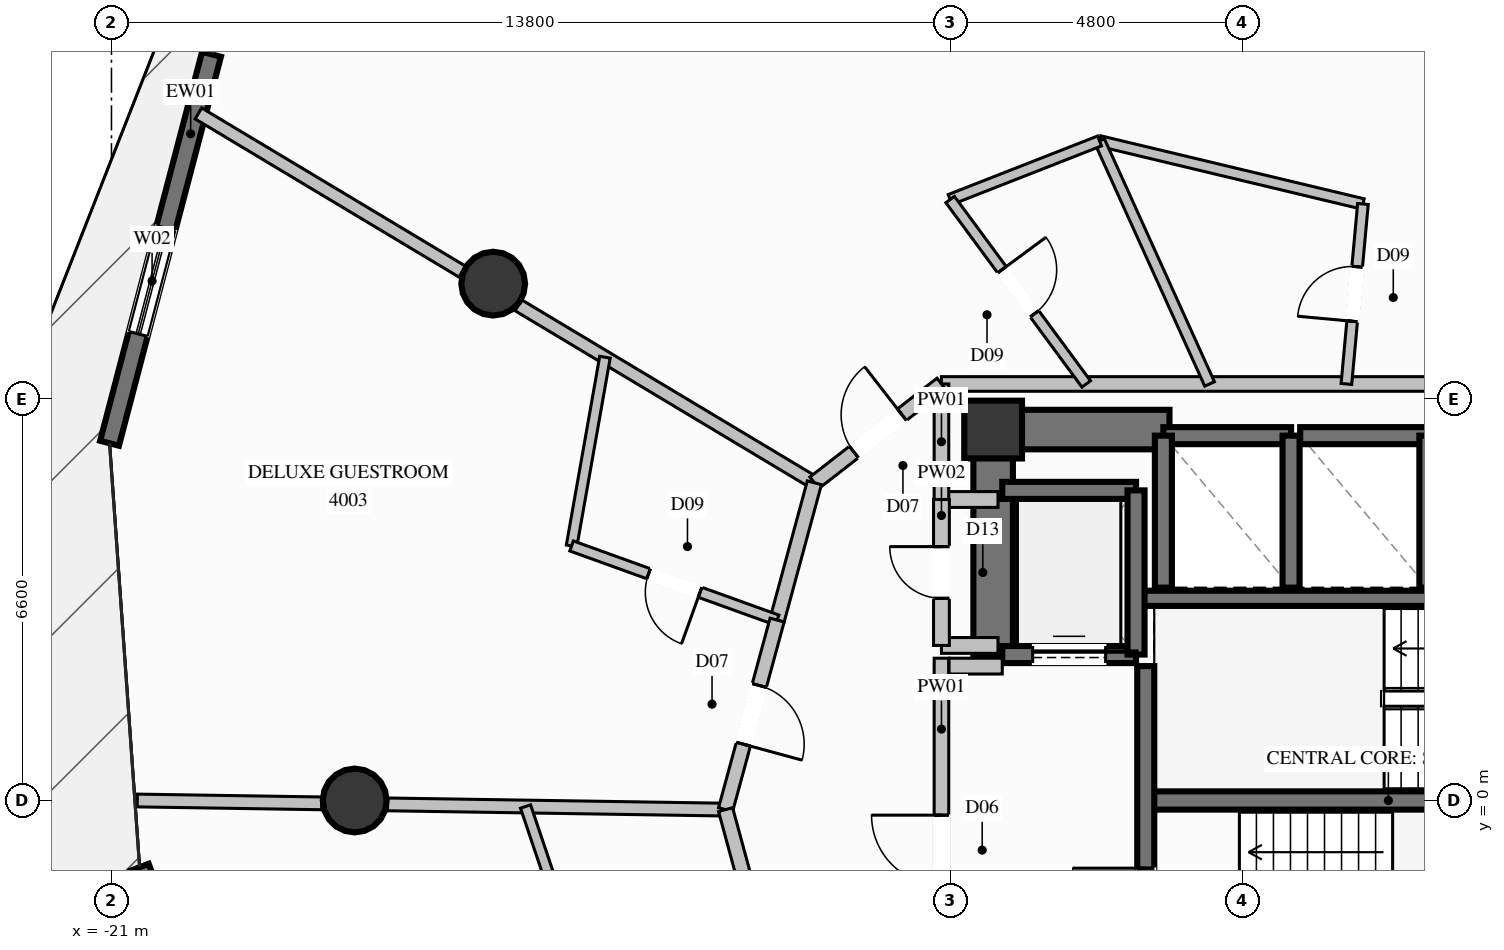
"""IFC4 building model, lengths in metres.
Left out: names, types, materials, properties, quantities, classifications, styles, units other than length and angle.
Written with IfcOpenShell. Run it as: python <this file> out.ifc"""

import sys

from ifc_helpers import new_model, si_unit, direction, frame, frame_2d, origin, origin_2d, place, context, subcontext, project, spatial, rectangle, circle, extrude, element, fill, save


model = new_model("IFC4")
c1 = context("Model", 3, precision=1e-05, world=origin(), true_north=direction((0.0, 1.0)))
c2 = subcontext(c1, "Body", "Model", "MODEL_VIEW")
j1 = project(units=[si_unit("LENGTHUNIT", "METRE"), si_unit("PLANEANGLEUNIT", "RADIAN")], contexts=[c1])
p1 = place(None, origin())
s1 = spatial("IfcSite", under=j1, at=p1, CompositionType="ELEMENT")
p2 = place(p1, origin())
s2 = spatial("IfcBuilding", under=s1, at=p2, CompositionType="ELEMENT")
p3 = place(p2, frame((0.0, 0.0, 149.4)))
s3 = spatial("IfcBuildingStorey", under=s2, at=p3, CompositionType="ELEMENT", Elevation=149.4)
p4 = place(p3, frame((-6.5, 6.1, 0.0), z_axis=(0.0, 0.0, 1.0), x_axis=(1.0, 0.0, 0.0)))
e1 = element("IfcColumn", 1, at=p4, inside=s3, PredefinedType="COLUMN", context=c2, shape_type="SweptSolid", body=[
    extrude(rectangle(XDim=0.95, YDim=0.95, at=origin_2d()), origin(), (0.0, 0.0, 1.0), 3.6),
])
p5 = place(p3, frame((-3.99, 0.0, 0.0), z_axis=(0.0, 0.0, 1.0), x_axis=(1.0, 0.0, 0.0)))
e2 = element("IfcWall", 2, at=p5, inside=s3, PredefinedType="SHEAR", context=c2, shape_type="SweptSolid", body=[
    extrude(rectangle(XDim=7.98, YDim=0.3, at=frame_2d((3.99, 0.0))), origin(), (0.0, 0.0, 1.0), 3.6),
])
p6 = place(p3, frame((-4.13, 3.325, 0.0), z_axis=(0.0, 0.0, 1.0), x_axis=(1.0, 0.0, 0.0)))
e3 = element("IfcWall", 3, at=p6, inside=s3, PredefinedType="SOLIDWALL", context=c2, shape_type="SweptSolid", body=[
    extrude(rectangle(XDim=8.26, YDim=0.25, at=frame_2d((4.13, 0.0))), origin(), (0.0, 0.0, 1.0), 3.6),
])
p7 = place(p3, frame((-6.175, 6.1, 0.0), z_axis=(0.0, 0.0, 1.0), x_axis=(1.0, 0.0, 0.0)))
e4 = element("IfcWall", 4, at=p7, inside=s3, PredefinedType="SHEAR", context=c2, shape_type="SweptSolid", body=[
    extrude(rectangle(XDim=2.575, YDim=0.65, at=frame_2d((1.288, 0.0))), origin(), (0.0, 0.0, 1.0), 3.6),
])
p8 = place(p3, frame((-6.5, 2.35, 0.0), z_axis=(0.0, 0.0, 1.0), x_axis=(0.0, 1.0, 0.0)))
e5 = element("IfcWall", 5, at=p8, inside=s3, PredefinedType="SHEAR", context=c2, shape_type="SweptSolid", body=[
    extrude(rectangle(XDim=4.075, YDim=0.65, at=frame_2d((2.038, 0.0))), origin(), (0.0, 0.0, 1.0), 3.6),
])
for number, where, z_axis, x_axis in (
    (6, (-14.722, 8.5, 0.0), (0.0, 0.0, 1.0), (1.0, 0.0, 0.0)),
    (7, (-17.0, 0.0, 0.0), (0.0, 0.0, 1.0), (1.0, 0.0, 0.0)),
):
    element("IfcColumn", number, at=place(p3, frame(where, z_axis=z_axis, x_axis=x_axis)), inside=s3, PredefinedType="COLUMN", context=c2, shape_type="SweptSolid", body=[
        extrude(circle(Radius=0.525, at=origin_2d()), origin(), (0.0, 0.0, 1.0), 3.6),
    ])
p9 = place(p3, frame((-21.032, 5.875, 0.0), z_axis=(0.0, 0.0, 1.0), x_axis=(0.253586412891, 0.967312737018, 0.0)))
e8 = element("IfcWall", 8, at=p9, inside=s3, PredefinedType="SOLIDWALL", context=c2, shape_type="SweptSolid", body=[
    extrude(rectangle(XDim=6.613, YDim=0.32, at=frame_2d((3.307, 0.0))), origin(), (0.0, 0.0, 1.0), 3.35),
])
p10 = place(p9, frame((1.859, 0.0, 0.35)))
e9 = element("IfcOpeningElement", 9, at=p10, cuts=e8, PredefinedType="OPENING", context=c2, shape_type="SweptSolid", body=[
    extrude(rectangle(XDim=1.8, YDim=2.6, at=frame_2d((0.9, 1.3))), frame((0.0, 0.17, 0.0), z_axis=(0.0, -1.0, 0.0), x_axis=(1.0, 0.0, 0.0)), (0.0, 0.0, 1.0), 0.34),
])
p11 = place(p3, frame((-17.92, -7.961, 0.0), z_axis=(0.0, 0.0, 1.0), x_axis=(-0.356387771418, 0.93433813814, 0.0)))
e10 = element("IfcWall", 10, at=p11, inside=s3, PredefinedType="SOLIDWALL", context=c2, shape_type="SweptSolid", body=[
    extrude(rectangle(XDim=7.346, YDim=0.32, at=frame_2d((3.673, 0.0))), origin(), (0.0, 0.0, 1.0), 3.35),
])
p12 = place(p11, frame((2.773, 0.0, 0.35)))
e11 = element("IfcOpeningElement", 11, at=p12, cuts=e10, PredefinedType="OPENING", context=c2, shape_type="SweptSolid", body=[
    extrude(rectangle(XDim=1.8, YDim=2.6, at=frame_2d((0.9, 1.3))), frame((0.0, 0.17, 0.0), z_axis=(0.0, -1.0, 0.0), x_axis=(1.0, 0.0, 0.0)), (0.0, 0.0, 1.0), 0.34),
])
p13 = place(p3, frame((-1.6, 6.0, 0.0), z_axis=(0.0, 0.0, 1.0), x_axis=(-1.0, 0.0, 0.0)))
e12 = element("IfcWall", 12, at=p13, inside=s3, PredefinedType="SOLIDWALL", context=c2, shape_type="SweptSolid", body=[
    extrude(rectangle(XDim=2.1, YDim=0.28, at=frame_2d((1.05, 0.0))), origin(), (0.0, 0.0, 1.0), 3.35),
])
for number, where, z_axis, x_axis in (
    (13, (-3.7, 6.0, 0.0), (0.0, 0.0, 1.0), (0.0, -1.0, 0.0)),
    (14, (-1.6, 3.5, 0.0), (0.0, 0.0, 1.0), (0.0, 1.0, 0.0)),
):
    element("IfcWall", number, at=place(p3, frame(where, z_axis=z_axis, x_axis=x_axis)), inside=s3, PredefinedType="SOLIDWALL", context=c2, shape_type="SweptSolid", body=[
        extrude(rectangle(XDim=2.5, YDim=0.28, at=frame_2d((1.25, 0.0))), origin(), (0.0, 0.0, 1.0), 3.35),
    ])
p14 = place(p3, frame((0.65, 6.0, 0.0), z_axis=(0.0, 0.0, 1.0), x_axis=(-1.0, 0.0, 0.0)))
e15 = element("IfcWall", 15, at=p14, inside=s3, PredefinedType="SOLIDWALL", context=c2, shape_type="SweptSolid", body=[
    extrude(rectangle(XDim=2.1, YDim=0.28, at=frame_2d((1.05, 0.0))), origin(), (0.0, 0.0, 1.0), 3.35),
])
p15 = place(p3, frame((0.65, 3.5, 0.0), z_axis=(0.0, 0.0, 1.0), x_axis=(0.0, 1.0, 0.0)))
e16 = element("IfcWall", 16, at=p15, inside=s3, PredefinedType="SOLIDWALL", context=c2, shape_type="SweptSolid", body=[
    extrude(rectangle(XDim=2.5, YDim=0.28, at=frame_2d((1.25, 0.0))), origin(), (0.0, 0.0, 1.0), 3.35),
])
p16 = place(p3, frame((-6.35, 2.4, 0.0), z_axis=(0.0, 0.0, 1.0), x_axis=(1.0, 0.0, 0.0)))
e17 = element("IfcWall", 17, at=p16, inside=s3, PredefinedType="SOLIDWALL", context=c2, shape_type="SweptSolid", body=[
    extrude(rectangle(XDim=2.2, YDim=0.28, at=frame_2d((1.1, 0.0))), origin(), (0.0, 0.0, 1.0), 3.35),
])
p17 = place(p16, frame((0.5, 0.0, 0.0)))
e18 = element("IfcOpeningElement", 18, at=p17, cuts=e17, PredefinedType="OPENING", context=c2, shape_type="SweptSolid", body=[
    extrude(rectangle(XDim=1.2, YDim=2.2, at=frame_2d((0.6, 1.1))), frame((0.0, 0.15, 0.0), z_axis=(0.0, -1.0, 0.0), x_axis=(1.0, 0.0, 0.0)), (0.0, 0.0, 1.0), 0.3),
])
p18 = place(p3, frame((-4.15, 5.1, 0.0), z_axis=(0.0, 0.0, 1.0), x_axis=(-1.0, 0.0, 0.0)))
e19 = element("IfcWall", 19, at=p18, inside=s3, PredefinedType="SOLIDWALL", context=c2, shape_type="SweptSolid", body=[
    extrude(rectangle(XDim=2.2, YDim=0.28, at=frame_2d((1.1, 0.0))), origin(), (0.0, 0.0, 1.0), 3.35),
])
p19 = place(p3, frame((-4.15, 2.4, 0.0), z_axis=(0.0, 0.0, 1.0), x_axis=(0.0, 1.0, 0.0)))
e20 = element("IfcWall", 20, at=p19, inside=s3, PredefinedType="SOLIDWALL", context=c2, shape_type="SweptSolid", body=[
    extrude(rectangle(XDim=2.7, YDim=0.28, at=frame_2d((1.35, 0.0))), origin(), (0.0, 0.0, 1.0), 3.35),
])
p20 = place(p3, frame((-3.99, -3.25, 0.0), z_axis=(0.0, 0.0, 1.0), x_axis=(0.0, 1.0, 0.0)))
e21 = element("IfcWall", 21, at=p20, inside=s3, PredefinedType="SOLIDWALL", context=c2, shape_type="SweptSolid", body=[
    extrude(rectangle(XDim=5.46, YDim=0.28, at=frame_2d((2.73, 0.0))), origin(), (0.0, 0.0, 1.0), 3.35),
])
p21 = place(p20, frame((0.937, 0.0, 0.0)))
e22 = element("IfcOpeningElement", 22, at=p21, cuts=e21, PredefinedType="OPENING", context=c2, shape_type="SweptSolid", body=[
    extrude(rectangle(XDim=1.2, YDim=2.2, at=frame_2d((0.6, 1.1))), frame((0.0, 0.15, 0.0), z_axis=(0.0, -1.0, 0.0), x_axis=(1.0, 0.0, 0.0)), (0.0, 0.0, 1.0), 0.3),
])
p22 = place(p3, frame((-7.35, -2.78, 0.0), z_axis=(0.0, 0.0, 1.0), x_axis=(0.0, 1.0, 0.0)))
e23 = element("IfcWall", 23, at=p22, inside=s3, PredefinedType="PARTITIONING", context=c2, shape_type="SweptSolid", body=[
    extrude(rectangle(XDim=5.12, YDim=0.24, at=frame_2d((2.56, 0.0))), origin(), (0.0, 0.0, 1.0), 2.435),
])
p23 = place(p22, frame((1.389, 0.0, 0.0)))
e24 = element("IfcOpeningElement", 24, at=p23, cuts=e23, PredefinedType="OPENING", context=c2, shape_type="SweptSolid", body=[
    extrude(rectangle(XDim=1.15, YDim=2.2, at=frame_2d((0.575, 1.1))), frame((0.0, 0.13, 0.0), z_axis=(0.0, -1.0, 0.0), x_axis=(1.0, 0.0, 0.0)), (0.0, 0.0, 1.0), 0.26),
])
p24 = place(p3, frame((-7.225, 2.21, 0.0), z_axis=(0.0, 0.0, 1.0), x_axis=(1.0, 0.0, 0.0)))
e25 = element("IfcWall", 25, at=p24, inside=s3, PredefinedType="PARTITIONING", context=c2, shape_type="SweptSolid", body=[
    extrude(rectangle(XDim=0.875, YDim=0.26, at=frame_2d((0.438, 0.0))), origin(), (0.0, 0.0, 1.0), 3.35),
])
for number, where, z_axis, x_axis in (
    (26, (-7.35, 4.95, 0.0), (0.0, 0.0, 1.0), (1.0, 0.0, 0.0)),
    (27, (-7.35, 2.55, 0.0), (0.0, 0.0, 1.0), (1.0, 0.0, 0.0)),
):
    element("IfcWall", number, at=place(p3, frame(where, z_axis=z_axis, x_axis=x_axis)), inside=s3, PredefinedType="PARTITIONING", context=c2, shape_type="SweptSolid", body=[
        extrude(rectangle(XDim=0.93, YDim=0.26, at=frame_2d((0.465, 0.0))), origin(), (0.0, 0.0, 1.0), 3.35),
    ])
p25 = place(p3, frame((-7.35, 2.55, 0.0), z_axis=(0.0, 0.0, 1.0), x_axis=(0.0, 1.0, 0.0)))
e28 = element("IfcWall", 28, at=p25, inside=s3, PredefinedType="PARTITIONING", context=c2, shape_type="SweptSolid", body=[
    extrude(rectangle(XDim=2.4, YDim=0.26, at=frame_2d((1.2, 0.0))), origin(), (0.0, 0.0, 1.0), 2.435),
])
p26 = place(p25, frame((0.775, 0.0, 0.0)))
e29 = element("IfcOpeningElement", 29, at=p26, cuts=e28, PredefinedType="OPENING", context=c2, shape_type="SweptSolid", body=[
    extrude(rectangle(XDim=0.85, YDim=2.05, at=frame_2d((0.425, 1.025))), frame((0.0, 0.14, 0.0), z_axis=(0.0, -1.0, 0.0), x_axis=(1.0, 0.0, 0.0)), (0.0, 0.0, 1.0), 0.28),
])
p27 = place(p3, frame((-7.35, 6.85, 0.0), z_axis=(0.0, 0.0, 1.0), x_axis=(1.0, 0.0, 0.0)))
e30 = element("IfcWall", 30, at=p27, inside=s3, PredefinedType="PARTITIONING", context=c2, shape_type="SweptSolid", body=[
    extrude(rectangle(XDim=14.7, YDim=0.24, at=frame_2d((7.35, 0.0))), origin(), (0.0, 0.0, 1.0), 2.435),
])
p28 = place(p3, frame((-7.35, 4.95, 0.0), z_axis=(0.0, 0.0, 1.0), x_axis=(0.0, 1.0, 0.0)))
e31 = element("IfcWall", 31, at=p28, inside=s3, PredefinedType="PARTITIONING", context=c2, shape_type="SweptSolid", body=[
    extrude(rectangle(XDim=1.9, YDim=0.24, at=frame_2d((0.95, 0.0))), origin(), (0.0, 0.0, 1.0), 2.435),
])
p29 = place(p3, frame((-9.44, 5.225, 0.0), z_axis=(0.0, 0.0, 1.0), x_axis=(-0.857690179355, 0.514166856417, 0.0)))
e32 = element("IfcWall", 32, at=p29, inside=s3, PredefinedType="PARTITIONING", context=c2, shape_type="SweptSolid", body=[
    extrude(rectangle(XDim=5.677, YDim=0.21, at=frame_2d((2.838, 0.0))), origin(), (0.0, 0.0, 1.0), 2.717),
])
p30 = place(p3, frame((-15.23, 8.697, 0.0), z_axis=(0.0, 0.0, 1.0), x_axis=(-0.857667413019, 0.514204831409, 0.0)))
e33 = element("IfcWall", 33, at=p30, inside=s3, PredefinedType="PARTITIONING", context=c2, shape_type="SweptSolid", body=[
    extrude(rectangle(XDim=5.06, YDim=0.21, at=frame_2d((2.53, 0.0))), origin(), (0.0, 0.0, 1.0), 3.35),
])
p31 = place(p3, frame((-10.9, -0.15, 0.0), z_axis=(0.0, 0.0, 1.0), x_axis=(-0.999880532043, 0.01545709035, 0.0)))
e34 = element("IfcWall", 34, at=p31, inside=s3, PredefinedType="PARTITIONING", context=c2, shape_type="SweptSolid", body=[
    extrude(rectangle(XDim=5.56, YDim=0.21, at=frame_2d((2.78, 0.0))), origin(), (0.0, 0.0, 1.0), 3.35),
])
p32 = place(p3, frame((-17.543, -0.047, 0.0), z_axis=(0.0, 0.0, 1.0), x_axis=(-0.999879342855, 0.015533825418, 0.0)))
e35 = element("IfcWall", 35, at=p32, inside=s3, PredefinedType="PARTITIONING", context=c2, shape_type="SweptSolid", body=[
    extrude(rectangle(XDim=3.033, YDim=0.21, at=frame_2d((1.517, 0.0))), origin(), (0.0, 0.0, 1.0), 3.35),
])
p33 = place(p3, frame((-4.75, 10.846, 0.0), z_axis=(0.0, 0.0, 1.0), x_axis=(0.972580508787, -0.232566450563, 0.0)))
e36 = element("IfcWall", 36, at=p33, inside=s3, PredefinedType="PLUMBINGWALL", context=c2, shape_type="SweptSolid", body=[
    extrude(rectangle(XDim=4.454, YDim=0.175, at=frame_2d((2.227, 0.0))), origin(), (0.0, 0.0, 1.0), 3.35),
])
p34 = place(p3, frame((-4.75, 10.846, 0.0), z_axis=(0.0, 0.0, 1.0), x_axis=(0.412624318024, -0.910901296615, 0.0)))
e37 = element("IfcWall", 37, at=p34, inside=s3, PredefinedType="PLUMBINGWALL", context=c2, shape_type="SweptSolid", body=[
    extrude(rectangle(XDim=4.387, YDim=0.175, at=frame_2d((2.193, 0.0))), origin(), (0.0, 0.0, 1.0), 3.35),
])
p35 = place(p3, frame((-0.69, 6.85, 0.0), z_axis=(0.0, 0.0, 1.0), x_axis=(0.091498434122, 0.995805220188, 0.0)))
e38 = element("IfcWall", 38, at=p35, inside=s3, PredefinedType="PLUMBINGWALL", context=c2, shape_type="SweptSolid", body=[
    extrude(rectangle(XDim=2.972, YDim=0.175, at=frame_2d((1.486, 0.0))), origin(), (0.0, 0.0, 1.0), 3.35),
])
p36 = place(p35, frame((1.036, 0.0, 0.0)))
e39 = element("IfcOpeningElement", 39, at=p36, cuts=e38, PredefinedType="OPENING", context=c2, shape_type="SweptSolid", body=[
    extrude(rectangle(XDim=0.9, YDim=2.1, at=frame_2d((0.45, 1.05))), frame((0.0, 0.098, 0.0), z_axis=(0.0, -1.0, 0.0), x_axis=(1.0, 0.0, 0.0)), (0.0, 0.0, 1.0), 0.195),
])
p37 = place(p3, frame((-7.207, 9.883, 0.0), z_axis=(0.0, 0.0, 1.0), x_axis=(0.931057024994, 0.364873698984, 0.0)))
e40 = element("IfcWall", 40, at=p37, inside=s3, PredefinedType="PLUMBINGWALL", context=c2, shape_type="SweptSolid", body=[
    extrude(rectangle(XDim=2.639, YDim=0.175, at=frame_2d((1.319, 0.0))), origin(), (0.0, 0.0, 1.0), 3.35),
])
p38 = place(p3, frame((-7.207, 9.883, 0.0), z_axis=(0.0, 0.0, 1.0), x_axis=(0.593753460512, -0.804647020829, 0.0)))
e41 = element("IfcWall", 41, at=p38, inside=s3, PredefinedType="PLUMBINGWALL", context=c2, shape_type="SweptSolid", body=[
    extrude(rectangle(XDim=3.769, YDim=0.175, at=frame_2d((1.885, 0.0))), origin(), (0.0, 0.0, 1.0), 2.717),
])
p39 = place(p38, frame((1.435, 0.0, 0.0)))
e42 = element("IfcOpeningElement", 42, at=p39, cuts=e41, PredefinedType="OPENING", context=c2, shape_type="SweptSolid", body=[
    extrude(rectangle(XDim=0.9, YDim=2.1, at=frame_2d((0.45, 1.05))), frame((0.0, 0.098, 0.0), z_axis=(0.0, -1.0, 0.0), x_axis=(1.0, 0.0, 0.0)), (0.0, 0.0, 1.0), 0.195),
])
p40 = place(p3, frame((-9.44, 5.225, 0.0), z_axis=(0.0, 0.0, 1.0), x_axis=(0.789431664708, 0.613838453306, 0.0)))
e43 = element("IfcWall", 43, at=p40, inside=s3, PredefinedType="PARTITIONING", context=c2, shape_type="SweptSolid", body=[
    extrude(rectangle(XDim=2.647, YDim=0.24, at=frame_2d((1.324, 0.0))), origin(), (0.0, 0.0, 1.0), 3.35),
])
p41 = place(p40, frame((0.824, 0.0, 0.0)))
e44 = element("IfcOpeningElement", 44, at=p41, cuts=e43, PredefinedType="OPENING", context=c2, shape_type="SweptSolid", body=[
    extrude(rectangle(XDim=1.0, YDim=2.2, at=frame_2d((0.5, 1.1))), frame((0.0, 0.13, 0.0), z_axis=(0.0, -1.0, 0.0), x_axis=(1.0, 0.0, 0.0)), (0.0, 0.0, 1.0), 0.26),
])
p42 = place(p3, frame((-9.44, 5.225, 0.0), z_axis=(0.0, 0.0, 1.0), x_axis=(-0.262004776073, -0.965066576623, 0.0)))
e45 = element("IfcWall", 45, at=p42, inside=s3, PredefinedType="PARTITIONING", context=c2, shape_type="SweptSolid", body=[
    extrude(rectangle(XDim=2.34, YDim=0.24, at=frame_2d((1.17, 0.0))), origin(), (0.0, 0.0, 1.0), 3.35),
])
p43 = place(p3, frame((-12.884, 7.29, 0.0), z_axis=(0.0, 0.0, 1.0), x_axis=(-0.174187389085, -0.984712523269, 0.0)))
e46 = element("IfcWall", 46, at=p43, inside=s3, PredefinedType="PLUMBINGWALL", context=c2, shape_type="SweptSolid", body=[
    extrude(rectangle(XDim=3.152, YDim=0.175, at=frame_2d((1.576, 0.0))), origin(), (0.0, 0.0, 1.0), 3.35),
])
p44 = place(p3, frame((-10.053, 2.967, 0.0), z_axis=(0.0, 0.0, 1.0), x_axis=(-0.940696709382, 0.339248730223, 0.0)))
e47 = element("IfcWall", 47, at=p44, inside=s3, PredefinedType="PLUMBINGWALL", context=c2, shape_type="SweptSolid", body=[
    extrude(rectangle(XDim=3.593, YDim=0.175, at=frame_2d((1.797, 0.0))), origin(), (0.0, 0.0, 1.0), 3.35),
])
p45 = place(p44, frame((1.347, 0.0, 0.0)))
e48 = element("IfcOpeningElement", 48, at=p45, cuts=e47, PredefinedType="OPENING", context=c2, shape_type="SweptSolid", body=[
    extrude(rectangle(XDim=0.9, YDim=2.1, at=frame_2d((0.45, 1.05))), frame((0.0, 0.098, 0.0), z_axis=(0.0, -1.0, 0.0), x_axis=(1.0, 0.0, 0.0)), (0.0, 0.0, 1.0), 0.195),
])
p46 = place(p3, frame((-10.053, 2.967, 0.0), z_axis=(0.0, 0.0, 1.0), x_axis=(-0.262209089996, -0.965011084456, 0.0)))
e49 = element("IfcWall", 49, at=p46, inside=s3, PredefinedType="PARTITIONING", context=c2, shape_type="SweptSolid", body=[
    extrude(rectangle(XDim=3.23, YDim=0.24, at=frame_2d((1.615, 0.0))), origin(), (0.0, 0.0, 1.0), 3.35),
])
p47 = place(p46, frame((1.115, 0.0, 0.0)))
e50 = element("IfcOpeningElement", 50, at=p47, cuts=e49, PredefinedType="OPENING", context=c2, shape_type="SweptSolid", body=[
    extrude(rectangle(XDim=1.0, YDim=2.2, at=frame_2d((0.5, 1.1))), frame((0.0, 0.13, 0.0), z_axis=(0.0, -1.0, 0.0), x_axis=(1.0, 0.0, 0.0)), (0.0, 0.0, 1.0), 0.26),
])
p48 = place(p3, frame((-10.9, -0.15, 0.0), z_axis=(0.0, 0.0, 1.0), x_axis=(0.262013132791, -0.965064307829, 0.0)))
e51 = element("IfcWall", 51, at=p48, inside=s3, PredefinedType="PARTITIONING", context=c2, shape_type="SweptSolid", body=[
    extrude(rectangle(XDim=2.339, YDim=0.24, at=frame_2d((1.169, 0.0))), origin(), (0.0, 0.0, 1.0), 3.35),
])
p49 = place(p3, frame((-14.19, -0.099, 0.0), z_axis=(0.0, 0.0, 1.0), x_axis=(0.319377775225, -0.947627477806, 0.0)))
e52 = element("IfcWall", 52, at=p49, inside=s3, PredefinedType="PLUMBINGWALL", context=c2, shape_type="SweptSolid", body=[
    extrude(rectangle(XDim=3.021, YDim=0.175, at=frame_2d((1.51, 0.0))), origin(), (0.0, 0.0, 1.0), 3.35),
])
p50 = place(p10, origin())
e53 = element("IfcWindow", 53, at=p50, inside=s3, PartitioningType="SINGLE_PANEL", PredefinedType="WINDOW", context=c2, shape_type="SweptSolid", body=[
    extrude(rectangle(XDim=1.8, YDim=2.6, at=frame_2d((0.9, 1.3))), frame((0.0, 0.03, 0.0), z_axis=(0.0, -1.0, 0.0), x_axis=(1.0, 0.0, 0.0)), (0.0, 0.0, 1.0), 0.06),
])
fill(e9, e53)
p51 = place(p17, origin())
e54 = element("IfcDoor", 54, at=p51, inside=s3, OperationType="SLIDING_TO_LEFT", PredefinedType="DOOR", context=c2, shape_type="SweptSolid", body=[
    extrude(rectangle(XDim=1.2, YDim=2.2, at=frame_2d((0.6, 1.1))), frame((0.0, 0.025, 0.0), z_axis=(0.0, -1.0, 0.0), x_axis=(1.0, 0.0, 0.0)), (0.0, 0.0, 1.0), 0.05),
])
fill(e18, e54)
p52 = place(p21, origin())
e55 = element("IfcDoor", 55, at=p52, inside=s3, OperationType="SINGLE_SWING_RIGHT", PredefinedType="DOOR", context=c2, shape_type="SweptSolid", body=[
    extrude(rectangle(XDim=1.2, YDim=2.2, at=frame_2d((0.6, 1.1))), frame((0.0, 0.025, 0.0), z_axis=(0.0, -1.0, 0.0), x_axis=(1.0, 0.0, 0.0)), (0.0, 0.0, 1.0), 0.05),
])
fill(e22, e55)
p53 = place(p23, origin())
e56 = element("IfcDoor", 56, at=p53, inside=s3, OperationType="SINGLE_SWING_RIGHT", PredefinedType="DOOR", context=c2, shape_type="SweptSolid", body=[
    extrude(rectangle(XDim=1.15, YDim=2.2, at=frame_2d((0.575, 1.1))), frame((0.0, 0.025, 0.0), z_axis=(0.0, -1.0, 0.0), x_axis=(1.0, 0.0, 0.0)), (0.0, 0.0, 1.0), 0.05),
])
fill(e24, e56)
p54 = place(p26, origin())
e57 = element("IfcDoor", 57, at=p54, inside=s3, OperationType="SINGLE_SWING_RIGHT", PredefinedType="DOOR", context=c2, shape_type="SweptSolid", body=[
    extrude(rectangle(XDim=0.85, YDim=2.05, at=frame_2d((0.425, 1.025))), frame((0.0, 0.025, 0.0), z_axis=(0.0, -1.0, 0.0), x_axis=(1.0, 0.0, 0.0)), (0.0, 0.0, 1.0), 0.05),
])
fill(e29, e57)
p55 = place(p36, origin())
e58 = element("IfcDoor", 58, at=p55, inside=s3, OperationType="SINGLE_SWING_LEFT", PredefinedType="DOOR", context=c2, shape_type="SweptSolid", body=[
    extrude(rectangle(XDim=0.9, YDim=2.1, at=frame_2d((0.45, 1.05))), frame((0.0, 0.025, 0.0), z_axis=(0.0, -1.0, 0.0), x_axis=(1.0, 0.0, 0.0)), (0.0, 0.0, 1.0), 0.05),
])
fill(e39, e58)
p56 = place(p39, origin())
e59 = element("IfcDoor", 59, at=p56, inside=s3, OperationType="SINGLE_SWING_LEFT", PredefinedType="DOOR", context=c2, shape_type="SweptSolid", body=[
    extrude(rectangle(XDim=0.9, YDim=2.1, at=frame_2d((0.45, 1.05))), frame((0.0, 0.025, 0.0), z_axis=(0.0, -1.0, 0.0), x_axis=(1.0, 0.0, 0.0)), (0.0, 0.0, 1.0), 0.05),
])
fill(e42, e59)
p57 = place(p41, origin())
e60 = element("IfcDoor", 60, at=p57, inside=s3, OperationType="SINGLE_SWING_RIGHT", PredefinedType="DOOR", context=c2, shape_type="SweptSolid", body=[
    extrude(rectangle(XDim=1.0, YDim=2.2, at=frame_2d((0.5, 1.1))), frame((0.0, 0.025, 0.0), z_axis=(0.0, -1.0, 0.0), x_axis=(1.0, 0.0, 0.0)), (0.0, 0.0, 1.0), 0.05),
])
fill(e44, e60)
p58 = place(p45, origin())
e61 = element("IfcDoor", 61, at=p58, inside=s3, OperationType="SINGLE_SWING_LEFT", PredefinedType="DOOR", context=c2, shape_type="SweptSolid", body=[
    extrude(rectangle(XDim=0.9, YDim=2.1, at=frame_2d((0.45, 1.05))), frame((0.0, 0.025, 0.0), z_axis=(0.0, -1.0, 0.0), x_axis=(1.0, 0.0, 0.0)), (0.0, 0.0, 1.0), 0.05),
])
fill(e48, e61)
p59 = place(p47, origin())
e62 = element("IfcDoor", 62, at=p59, inside=s3, OperationType="SINGLE_SWING_RIGHT", PredefinedType="DOOR", context=c2, shape_type="SweptSolid", body=[
    extrude(rectangle(XDim=1.0, YDim=2.2, at=frame_2d((0.5, 1.1))), frame((0.0, 0.025, 0.0), z_axis=(0.0, -1.0, 0.0), x_axis=(1.0, 0.0, 0.0)), (0.0, 0.0, 1.0), 0.05),
])
fill(e50, e62)
save(model, sys.argv[1])
